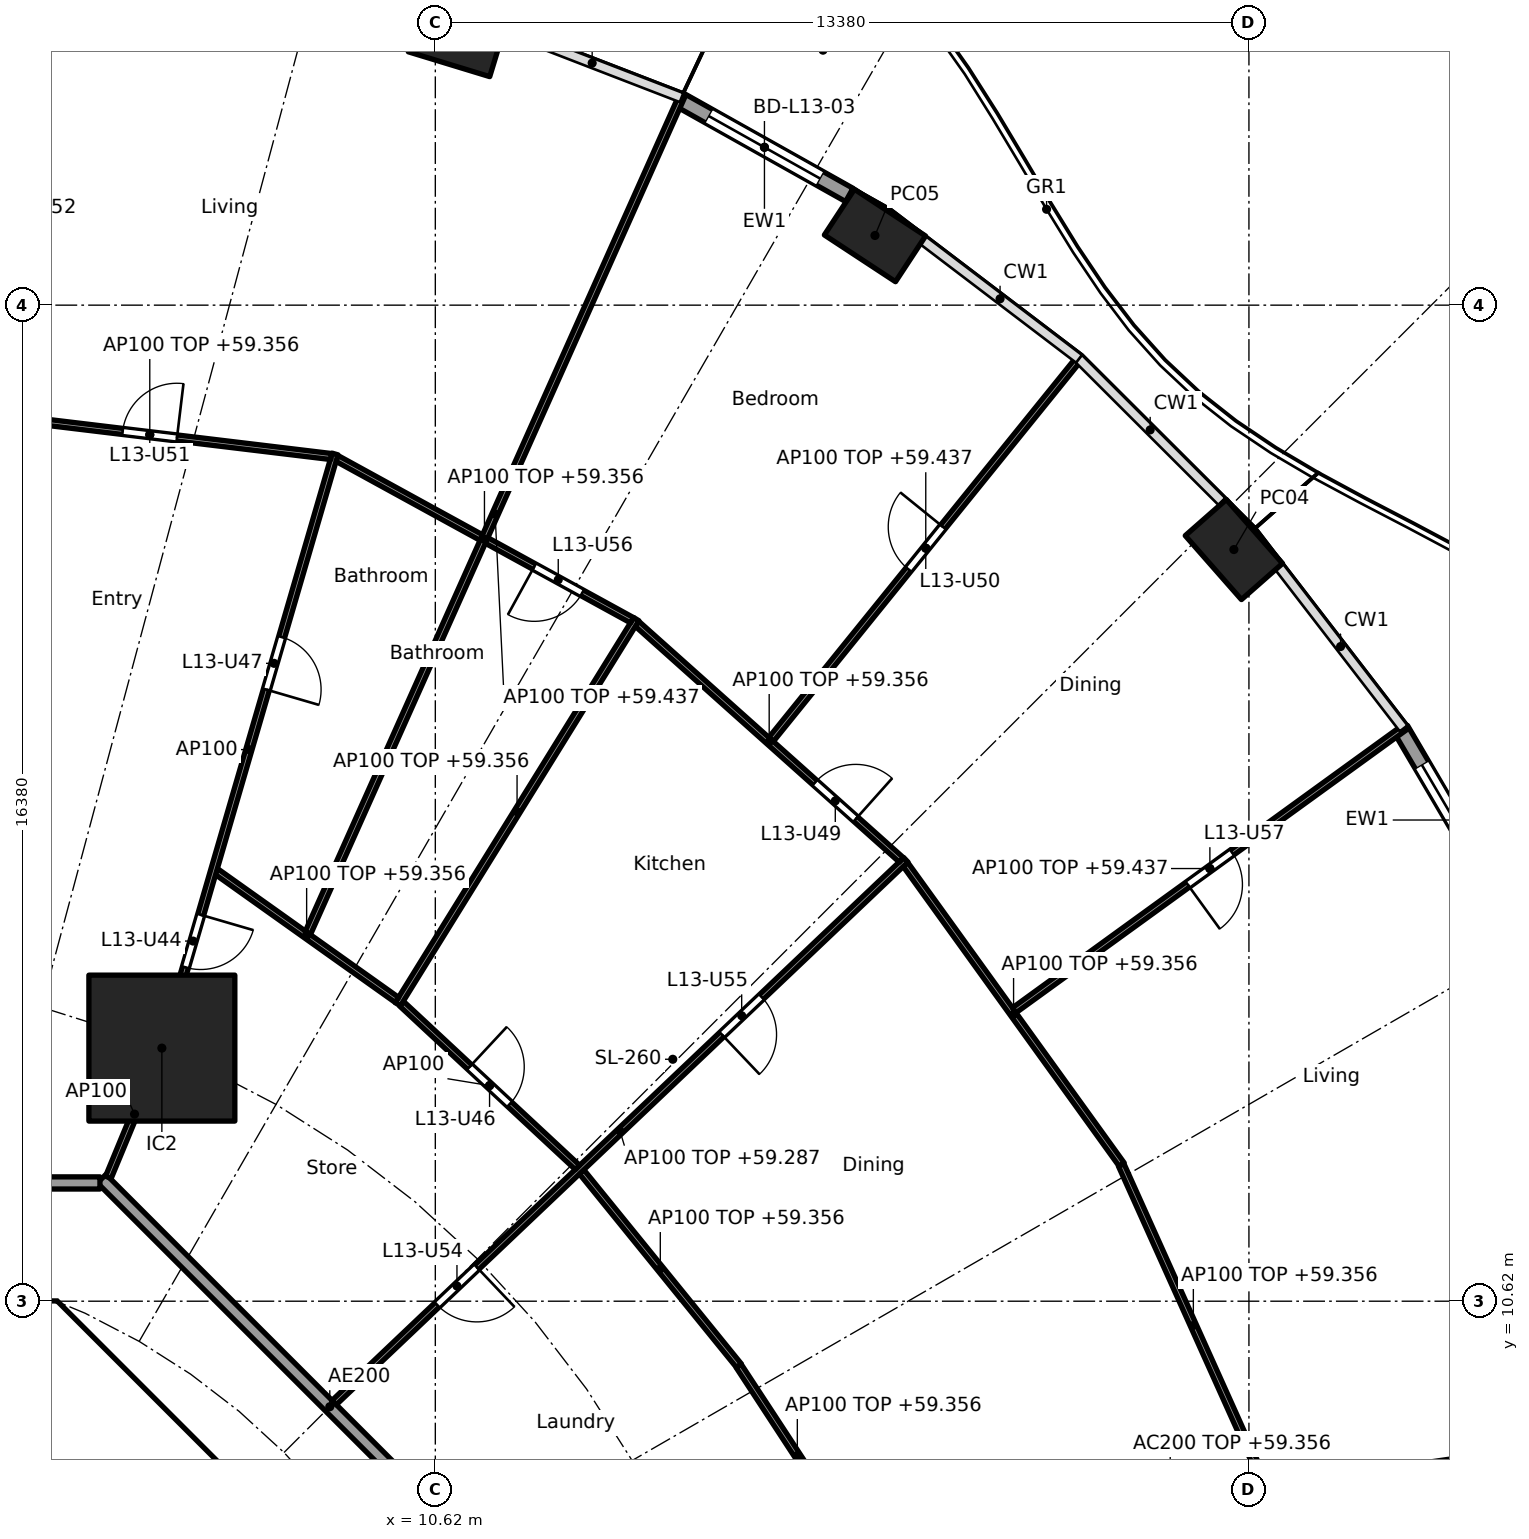
"""IFC4 building model, lengths in metres.
Left out: names, types, materials, properties, quantities, classifications, styles, units other than length and angle.
Written with IfcOpenShell. Run it as: python <this file> out.ifc"""

import sys

from ifc_helpers import new_model, si_unit, direction, frame, frame_2d, origin, origin_2d, place, context, subcontext, project, spatial, polyline, rectangle, hollow_rectangle, outline, extrude, element, fill, save


model = new_model("IFC4")
c1 = context("Model", 3, precision=1e-05, world=origin(), true_north=direction((0.0, 1.0)))
c2 = subcontext(c1, "Body", "Model", "MODEL_VIEW")
j1 = project(units=[si_unit("LENGTHUNIT", "METRE"), si_unit("PLANEANGLEUNIT", "RADIAN")], contexts=[c1])
p1 = place(None, origin())
s1 = spatial("IfcSite", under=j1, at=p1, CompositionType="ELEMENT")
p2 = place(p1, origin())
s2 = spatial("IfcBuilding", under=s1, at=p2, CompositionType="ELEMENT")
p3 = place(p2, frame((0.0, 0.0, 56.6)))
s3 = spatial("IfcBuildingStorey", under=s2, at=p3, CompositionType="ELEMENT", Elevation=56.6)
for number, where, z_axis, x_axis in (
    (1, (23.752, 22.981, 0.0), (0.0, 0.0, 1.0), (-0.66, 0.751, 0.0)),
    (2, (17.85, 28.146, 0.0), (0.0, 0.0, 1.0), (-0.836, 0.549, 0.0)),
    (3, (10.976, 31.393, 0.0), (0.0, 0.0, 1.0), (-0.957, 0.292, 0.0)),
):
    element("IfcColumn", number, at=place(p3, frame(where, z_axis=z_axis, x_axis=x_axis)), inside=s3, PredefinedType="COLUMN", context=c2, shape_type="SweptSolid", body=[
        extrude(hollow_rectangle(XDim=1.4, YDim=0.9, WallThickness=0.05, at=origin_2d()), origin(), (0.0, 0.0, 1.0), 3.7),
    ])
p4 = place(p3, frame((6.123, 14.782, 0.0), z_axis=(0.0, 0.0, 1.0), x_axis=(1.0, 0.0, 0.0)))
e4 = element("IfcColumn", 4, at=p4, inside=s3, PredefinedType="COLUMN", context=c2, shape_type="SweptSolid", body=[
    extrude(rectangle(XDim=2.4, YDim=2.4, at=origin_2d()), origin(), (0.0, 0.0, 1.0), 3.7),
])
p5 = place(p3, frame((26.5, 20.026, 0.0), z_axis=(0.0, 0.0, 1.0), x_axis=(0.506311160839, -0.862350861546, 0.0)))
e5 = element("IfcWall", 5, at=p5, inside=s3, PredefinedType="SOLIDWALL", context=c2, shape_type="SweptSolid", body=[
    extrude(rectangle(XDim=3.462, YDim=0.25, at=frame_2d((1.731, 0.0))), origin(), (0.0, 0.0, 1.0), 3.44),
])
p6 = place(p5, frame((0.681, 0.0, 0.0)))
e6 = element("IfcOpeningElement", 6, at=p6, cuts=e5, PredefinedType="OPENING", context=c2, shape_type="SweptSolid", body=[
    extrude(rectangle(XDim=2.1, YDim=2.4, at=frame_2d((1.05, 1.2))), frame((0.0, 0.135, 0.0), z_axis=(0.0, -1.0, 0.0), x_axis=(1.0, 0.0, 0.0)), (0.0, 0.0, 1.0), 0.27),
])
p7 = place(p3, frame((14.637, 30.379, 0.0), z_axis=(0.0, 0.0, 1.0), x_axis=(0.872102558443, -0.489323132048, 0.0)))
e7 = element("IfcWall", 7, at=p7, inside=s3, PredefinedType="SOLIDWALL", context=c2, shape_type="SweptSolid", body=[
    extrude(rectangle(XDim=3.201, YDim=0.25, at=frame_2d((1.601, 0.0))), origin(), (0.0, 0.0, 1.0), 3.44),
])
p8 = place(p7, frame((0.551, 0.0, 0.0)))
e8 = element("IfcOpeningElement", 8, at=p8, cuts=e7, PredefinedType="OPENING", context=c2, shape_type="SweptSolid", body=[
    extrude(rectangle(XDim=2.1, YDim=2.4, at=frame_2d((1.05, 1.2))), frame((0.0, 0.135, 0.0), z_axis=(0.0, -1.0, 0.0), x_axis=(1.0, 0.0, 0.0)), (0.0, 0.0, 1.0), 0.27),
])
p9 = place(p3, frame((9.988, 4.613, 0.0), z_axis=(0.0, 0.0, 1.0), x_axis=(-0.707106781187, 0.707106781187, 0.0)))
e9 = element("IfcWall", 9, at=p9, inside=s3, PredefinedType="SHEAR", context=c2, shape_type="SweptSolid", body=[
    extrude(rectangle(XDim=7.602, YDim=0.6, at=frame_2d((3.801, 0.0))), origin(), (0.0, 0.0, 1.0), 3.44),
])
p10 = place(p9, frame((3.201, 0.0, 0.0)))
e10 = element("IfcOpeningElement", 10, at=p10, cuts=e9, PredefinedType="OPENING", context=c2, shape_type="SweptSolid", body=[
    extrude(rectangle(XDim=1.2, YDim=2.1, at=frame_2d((0.6, 1.05))), frame((0.0, 0.31, 0.0), z_axis=(0.0, -1.0, 0.0), x_axis=(1.0, 0.0, 0.0)), (0.0, 0.0, 1.0), 0.62),
])
p11 = place(p3, origin())
e11 = element("IfcWall", 11, at=p11, inside=s3, PredefinedType="SHEAR", context=c2, shape_type="SweptSolid", body=[
    extrude(outline(polyline([(-4.152, 10.025), (-4.401, 9.776), (-4.825, 10.2), (-4.401, 10.625), (4.401, 10.625), (4.825, 10.2), (4.401, 9.776), (4.152, 10.025), (-4.152, 10.025)])), origin(), (0.0, 0.0, 1.0), 3.44),
])
p12 = place(p3, frame((14.832, 6.13, 0.0), z_axis=(0.0, 0.0, 1.0), x_axis=(0.989836541293, 0.142209779978, 0.0)))
e12 = element("IfcWall", 12, at=p12, inside=s3, PredefinedType="PARTITIONING", context=c2, shape_type="SweptSolid", body=[
    extrude(rectangle(XDim=15.909, YDim=0.2, at=frame_2d((7.955, 0.0))), origin(), (0.0, 0.0, 1.0), 2.756),
])
p13 = place(p3, frame((12.635, 5.134, 0.0), z_axis=(0.0, 0.0, 1.0), x_axis=(-0.707106781187, 0.707106781187, 0.0)))
e13 = element("IfcWall", 13, at=p13, inside=s3, PredefinedType="PARTITIONING", context=c2, shape_type="SweptSolid", body=[
    extrude(rectangle(XDim=10.609, YDim=0.2, at=frame_2d((5.305, 0.0))), origin(), (0.0, 0.0, 1.0), 3.44),
])
p14 = place(p3, frame((5.104, 12.565, 0.0), z_axis=(0.0, 0.0, 1.0), x_axis=(-1.0, 0.0, 0.0)))
e14 = element("IfcWall", 14, at=p14, inside=s3, PredefinedType="PARTITIONING", context=c2, shape_type="SweptSolid", body=[
    extrude(rectangle(XDim=10.409, YDim=0.2, at=frame_2d((5.205, 0.0))), origin(), (0.0, 0.0, 1.0), 3.44),
])
p15 = place(p14, frame((1.185, 0.0, 0.0)))
e15 = element("IfcOpeningElement", 15, at=p15, cuts=e14, PredefinedType="OPENING", context=c2, shape_type="SweptSolid", body=[
    extrude(rectangle(XDim=1.0, YDim=2.1, at=frame_2d((0.5, 1.05))), frame((0.0, 0.11, 0.0), z_axis=(0.0, -1.0, 0.0), x_axis=(1.0, 0.0, 0.0)), (0.0, 0.0, 1.0), 0.22),
])
p16 = place(p3, frame((17.537, 6.61, 0.0), z_axis=(0.0, 0.0, 1.0), x_axis=(-0.547637987196, 0.836715384692, 0.0)))
e16 = element("IfcWall", 16, at=p16, inside=s3, PredefinedType="PARTITIONING", context=c2, shape_type="SweptSolid", body=[
    extrude(rectangle(XDim=3.52, YDim=0.1, at=frame_2d((1.76, 0.0))), origin(), (0.0, 0.0, 1.0), 2.756),
])
p17 = place(p3, frame((24.273, 7.584, 0.0), z_axis=(0.0, 0.0, 1.0), x_axis=(-0.410201529109, 0.911994904326, 0.0)))
e17 = element("IfcWall", 17, at=p17, inside=s3, PredefinedType="PARTITIONING", context=c2, shape_type="SweptSolid", body=[
    extrude(rectangle(XDim=5.787, YDim=0.1, at=frame_2d((2.894, 0.0))), origin(), (0.0, 0.0, 1.0), 2.756),
])
p18 = place(p3, frame((15.614, 9.559, 0.0), z_axis=(0.0, 0.0, 1.0), x_axis=(-0.63012473344, 0.776493928056, 0.0)))
e18 = element("IfcWall", 18, at=p18, inside=s3, PredefinedType="PARTITIONING", context=c2, shape_type="SweptSolid", body=[
    extrude(rectangle(XDim=4.106, YDim=0.1, at=frame_2d((2.053, 0.0))), origin(), (0.0, 0.0, 1.0), 2.756),
])
p19 = place(p3, frame((21.908, 12.866, 0.0), z_axis=(0.0, 0.0, 1.0), x_axis=(-0.584558392935, 0.811351640936, 0.0)))
e19 = element("IfcWall", 19, at=p19, inside=s3, PredefinedType="PARTITIONING", context=c2, shape_type="SweptSolid", body=[
    extrude(rectangle(XDim=6.084, YDim=0.1, at=frame_2d((3.042, 0.0))), origin(), (0.0, 0.0, 1.0), 2.756),
])
p20 = place(p3, frame((20.141, 15.405, 0.0), z_axis=(0.0, 0.0, 1.0), x_axis=(0.809834895779, 0.58665785734, 0.0)))
e20 = element("IfcWall", 20, at=p20, inside=s3, PredefinedType="PARTITIONING", context=c2, shape_type="SweptSolid", body=[
    extrude(rectangle(XDim=7.945, YDim=0.1, at=frame_2d((3.973, 0.0))), origin(), (0.0, 0.0, 1.0), 2.837),
])
p21 = place(p20, frame((3.522, 0.0, 0.0)))
e21 = element("IfcOpeningElement", 21, at=p21, cuts=e20, PredefinedType="OPENING", context=c2, shape_type="SweptSolid", body=[
    extrude(rectangle(XDim=0.9, YDim=2.1, at=frame_2d((0.45, 1.05))), frame((0.0, 0.06, 0.0), z_axis=(0.0, -1.0, 0.0), x_axis=(1.0, 0.0, 0.0)), (0.0, 0.0, 1.0), 0.12),
])
p22 = place(p3, frame((8.957, 8.953, 0.0), z_axis=(0.0, 0.0, 1.0), x_axis=(0.725250022034, 0.688485588476, 0.0)))
e22 = element("IfcWall", 22, at=p22, inside=s3, PredefinedType="PARTITIONING", context=c2, shape_type="SweptSolid", body=[
    extrude(rectangle(XDim=12.963, YDim=0.1, at=frame_2d((6.481, 0.0))), origin(), (0.0, 0.0, 1.0), 2.687),
])
p23 = place(p22, frame((2.333, 0.0, 0.0)))
e23 = element("IfcOpeningElement", 23, at=p23, cuts=e22, PredefinedType="OPENING", context=c2, shape_type="SweptSolid", body=[
    extrude(rectangle(XDim=0.9, YDim=2.1, at=frame_2d((0.45, 1.05))), frame((0.0, 0.06, 0.0), z_axis=(0.0, -1.0, 0.0), x_axis=(1.0, 0.0, 0.0)), (0.0, 0.0, 1.0), 0.12),
])
p24 = place(p22, frame((8.79, 0.0, 0.0)))
e24 = element("IfcOpeningElement", 24, at=p24, cuts=e22, PredefinedType="OPENING", context=c2, shape_type="SweptSolid", body=[
    extrude(rectangle(XDim=0.9, YDim=2.1, at=frame_2d((0.45, 1.05))), frame((0.0, 0.06, 0.0), z_axis=(0.0, -1.0, 0.0), x_axis=(1.0, 0.0, 0.0)), (0.0, 0.0, 1.0), 0.12),
])
p25 = place(p3, frame((12.958, 12.82, 0.0), z_axis=(0.0, 0.0, 1.0), x_axis=(-0.732022571638, 0.681280378855, 0.0)))
e25 = element("IfcWall", 25, at=p25, inside=s3, PredefinedType="PARTITIONING", context=c2, shape_type="SweptSolid", body=[
    extrude(rectangle(XDim=3.95, YDim=0.1, at=frame_2d((1.975, 0.0))), origin(), (0.0, 0.0, 1.0), 3.44),
])
p26 = place(p25, frame((1.525, 0.0, 0.0)))
e26 = element("IfcOpeningElement", 26, at=p26, cuts=e25, PredefinedType="OPENING", context=c2, shape_type="SweptSolid", body=[
    extrude(rectangle(XDim=0.9, YDim=2.1, at=frame_2d((0.45, 1.05))), frame((0.0, 0.06, 0.0), z_axis=(0.0, -1.0, 0.0), x_axis=(1.0, 0.0, 0.0)), (0.0, 0.0, 1.0), 0.12),
])
p27 = place(p3, frame((18.285, 17.877, 0.0), z_axis=(0.0, 0.0, 1.0), x_axis=(-0.745806142791, 0.666163041136, 0.0)))
e27 = element("IfcWall", 27, at=p27, inside=s3, PredefinedType="PARTITIONING", context=c2, shape_type="SweptSolid", body=[
    extrude(rectangle(XDim=5.831, YDim=0.1, at=frame_2d((2.915, 0.0))), origin(), (0.0, 0.0, 1.0), 2.756),
])
p28 = place(p27, frame((1.008, 0.0, 0.0)))
e28 = element("IfcOpeningElement", 28, at=p28, cuts=e27, PredefinedType="OPENING", context=c2, shape_type="SweptSolid", body=[
    extrude(rectangle(XDim=0.9, YDim=2.1, at=frame_2d((0.45, 1.05))), frame((0.0, 0.06, 0.0), z_axis=(0.0, -1.0, 0.0), x_axis=(1.0, 0.0, 0.0)), (0.0, 0.0, 1.0), 0.12),
])
p29 = place(p3, frame((16.142, 19.858, 0.0), z_axis=(0.0, 0.0, 1.0), x_axis=(0.628738066508, 0.777617157555, 0.0)))
e29 = element("IfcWall", 29, at=p29, inside=s3, PredefinedType="PARTITIONING", context=c2, shape_type="SweptSolid", body=[
    extrude(rectangle(XDim=8.091, YDim=0.1, at=frame_2d((4.045, 0.0))), origin(), (0.0, 0.0, 1.0), 2.837),
])
p30 = place(p29, frame((3.595, 0.0, 0.0)))
e30 = element("IfcOpeningElement", 30, at=p30, cuts=e29, PredefinedType="OPENING", context=c2, shape_type="SweptSolid", body=[
    extrude(rectangle(XDim=0.9, YDim=2.1, at=frame_2d((0.45, 1.05))), frame((0.0, 0.06, 0.0), z_axis=(0.0, -1.0, 0.0), x_axis=(1.0, 0.0, 0.0)), (0.0, 0.0, 1.0), 0.12),
])
p31 = place(p3, frame((10.003, 15.503, 0.0), z_axis=(0.0, 0.0, 1.0), x_axis=(0.52645953022, 0.850200189979, 0.0)))
e31 = element("IfcWall", 31, at=p31, inside=s3, PredefinedType="PARTITIONING", context=c2, shape_type="SweptSolid", body=[
    extrude(rectangle(XDim=7.45, YDim=0.1, at=frame_2d((3.725, 0.0))), origin(), (0.0, 0.0, 1.0), 2.756),
])
p32 = place(p3, frame((9.989, 15.574, 0.0), z_axis=(0.0, 0.0, 1.0), x_axis=(-0.81494477814, 0.57953861699, 0.0)))
e32 = element("IfcWall", 32, at=p32, inside=s3, PredefinedType="PARTITIONING", context=c2, shape_type="SweptSolid", body=[
    extrude(rectangle(XDim=3.644, YDim=0.1, at=frame_2d((1.822, 0.0))), origin(), (0.0, 0.0, 1.0), 2.756),
])
p33 = place(p3, frame((13.855, 21.818, 0.0), z_axis=(0.0, 0.0, 1.0), x_axis=(-0.876794415294, 0.480865421203, 0.0)))
e33 = element("IfcWall", 33, at=p33, inside=s3, PredefinedType="PARTITIONING", context=c2, shape_type="SweptSolid", body=[
    extrude(rectangle(XDim=5.536, YDim=0.1, at=frame_2d((2.768, 0.0))), origin(), (0.0, 0.0, 1.0), 2.756),
])
p34 = place(p33, frame((0.934, 0.0, 0.0)))
e34 = element("IfcOpeningElement", 34, at=p34, cuts=e33, PredefinedType="OPENING", context=c2, shape_type="SweptSolid", body=[
    extrude(rectangle(XDim=0.9, YDim=2.1, at=frame_2d((0.45, 1.05))), frame((0.0, 0.06, 0.0), z_axis=(0.0, -1.0, 0.0), x_axis=(1.0, 0.0, 0.0)), (0.0, 0.0, 1.0), 0.12),
])
p35 = place(p3, frame((8.524, 16.676, 0.0), z_axis=(0.0, 0.0, 1.0), x_axis=(0.408065177262, 0.912952797852, 0.0)))
e35 = element("IfcWall", 35, at=p35, inside=s3, PredefinedType="PARTITIONING", context=c2, shape_type="SweptSolid", body=[
    extrude(rectangle(XDim=15.089, YDim=0.1, at=frame_2d((7.544, 0.0))), origin(), (0.0, 0.0, 1.0), 2.837),
])
p36 = place(p3, frame((5.243, 12.657, 0.0), z_axis=(0.0, 0.0, 1.0), x_axis=(0.382719158442, 0.923864733477, 0.0)))
e36 = element("IfcWall", 36, at=p36, inside=s3, PredefinedType="PARTITIONING", context=c2, shape_type="SweptSolid", body=[
    extrude(rectangle(XDim=2.25, YDim=0.1, at=frame_2d((1.125, 0.0))), origin(), (0.0, 0.0, 1.0), 3.44),
])
p37 = place(p3, frame((6.137, 14.83, 0.0), z_axis=(0.0, 0.0, 1.0), x_axis=(0.279843546189, 0.960045618529, 0.0)))
e37 = element("IfcWall", 37, at=p37, inside=s3, PredefinedType="PARTITIONING", context=c2, shape_type="SweptSolid", body=[
    extrude(rectangle(XDim=10.127, YDim=0.1, at=frame_2d((5.063, 0.0))), origin(), (0.0, 0.0, 1.0), 3.44),
])
p38 = place(p37, frame((1.334, 0.0, 0.0)))
e38 = element("IfcOpeningElement", 38, at=p38, cuts=e37, PredefinedType="OPENING", context=c2, shape_type="SweptSolid", body=[
    extrude(rectangle(XDim=0.9, YDim=2.1, at=frame_2d((0.45, 1.05))), frame((0.0, 0.06, 0.0), z_axis=(0.0, -1.0, 0.0), x_axis=(1.0, 0.0, 0.0)), (0.0, 0.0, 1.0), 0.12),
])
p39 = place(p37, frame((6.091, 0.0, 0.0)))
e39 = element("IfcOpeningElement", 39, at=p39, cuts=e37, PredefinedType="OPENING", context=c2, shape_type="SweptSolid", body=[
    extrude(rectangle(XDim=0.9, YDim=2.1, at=frame_2d((0.45, 1.05))), frame((0.0, 0.06, 0.0), z_axis=(0.0, -1.0, 0.0), x_axis=(1.0, 0.0, 0.0)), (0.0, 0.0, 1.0), 0.12),
])
p40 = place(p3, frame((8.907, 24.51, 0.0), z_axis=(0.0, 0.0, 1.0), x_axis=(-0.992836798252, 0.119478416615, 0.0)))
e40 = element("IfcWall", 40, at=p40, inside=s3, PredefinedType="PARTITIONING", context=c2, shape_type="SweptSolid", body=[
    extrude(rectangle(XDim=6.01, YDim=0.1, at=frame_2d((3.005, 0.0))), origin(), (0.0, 0.0, 1.0), 2.756),
])
p41 = place(p40, frame((2.555, 0.0, 0.0)))
e41 = element("IfcOpeningElement", 41, at=p41, cuts=e40, PredefinedType="OPENING", context=c2, shape_type="SweptSolid", body=[
    extrude(rectangle(XDim=0.9, YDim=2.1, at=frame_2d((0.45, 1.05))), frame((0.0, 0.06, 0.0), z_axis=(0.0, -1.0, 0.0), x_axis=(1.0, 0.0, 0.0)), (0.0, 0.0, 1.0), 0.12),
])
p42 = place(p6, origin())
e42 = element("IfcDoor", 42, at=p42, inside=s3, OperationType="SLIDING_TO_LEFT", PredefinedType="DOOR", context=c2, shape_type="SweptSolid", body=[
    extrude(rectangle(XDim=2.1, YDim=2.4, at=frame_2d((1.05, 1.2))), frame((0.0, 0.025, 0.0), z_axis=(0.0, -1.0, 0.0), x_axis=(1.0, 0.0, 0.0)), (0.0, 0.0, 1.0), 0.05),
])
fill(e6, e42)
p43 = place(p8, origin())
e43 = element("IfcDoor", 43, at=p43, inside=s3, OperationType="SLIDING_TO_LEFT", PredefinedType="DOOR", context=c2, shape_type="SweptSolid", body=[
    extrude(rectangle(XDim=2.1, YDim=2.4, at=frame_2d((1.05, 1.2))), frame((0.0, 0.025, 0.0), z_axis=(0.0, -1.0, 0.0), x_axis=(1.0, 0.0, 0.0)), (0.0, 0.0, 1.0), 0.05),
])
fill(e8, e43)
p44 = place(p38, frame((0.9, 0.0, 0.0), x_axis=(-1.0, 0.0, 0.0)))
e44 = element("IfcDoor", 44, at=p44, inside=s3, OperationType="SINGLE_SWING_LEFT", PredefinedType="DOOR", context=c2, shape_type="SweptSolid", body=[
    extrude(rectangle(XDim=0.9, YDim=2.1, at=frame_2d((0.45, 1.05))), frame((0.0, 0.025, 0.0), z_axis=(0.0, -1.0, 0.0), x_axis=(1.0, 0.0, 0.0)), (0.0, 0.0, 1.0), 0.05),
])
fill(e38, e44)
p45 = place(p26, frame((0.9, 0.0, 0.0), x_axis=(-1.0, 0.0, 0.0)))
e45 = element("IfcDoor", 45, at=p45, inside=s3, OperationType="SINGLE_SWING_LEFT", PredefinedType="DOOR", context=c2, shape_type="SweptSolid", body=[
    extrude(rectangle(XDim=0.9, YDim=2.1, at=frame_2d((0.45, 1.05))), frame((0.0, 0.025, 0.0), z_axis=(0.0, -1.0, 0.0), x_axis=(1.0, 0.0, 0.0)), (0.0, 0.0, 1.0), 0.05),
])
fill(e26, e45)
p46 = place(p39, frame((0.9, 0.0, 0.0), x_axis=(-1.0, 0.0, 0.0)))
e46 = element("IfcDoor", 46, at=p46, inside=s3, OperationType="SINGLE_SWING_RIGHT", PredefinedType="DOOR", context=c2, shape_type="SweptSolid", body=[
    extrude(rectangle(XDim=0.9, YDim=2.1, at=frame_2d((0.45, 1.05))), frame((0.0, 0.025, 0.0), z_axis=(0.0, -1.0, 0.0), x_axis=(1.0, 0.0, 0.0)), (0.0, 0.0, 1.0), 0.05),
])
fill(e39, e46)
p47 = place(p28, frame((0.9, 0.0, 0.0), x_axis=(-1.0, 0.0, 0.0)))
e47 = element("IfcDoor", 47, at=p47, inside=s3, OperationType="SINGLE_SWING_RIGHT", PredefinedType="DOOR", context=c2, shape_type="SweptSolid", body=[
    extrude(rectangle(XDim=0.9, YDim=2.1, at=frame_2d((0.45, 1.05))), frame((0.0, 0.025, 0.0), z_axis=(0.0, -1.0, 0.0), x_axis=(1.0, 0.0, 0.0)), (0.0, 0.0, 1.0), 0.05),
])
fill(e28, e47)
p48 = place(p30, origin())
e48 = element("IfcDoor", 48, at=p48, inside=s3, OperationType="SINGLE_SWING_RIGHT", PredefinedType="DOOR", context=c2, shape_type="SweptSolid", body=[
    extrude(rectangle(XDim=0.9, YDim=2.1, at=frame_2d((0.45, 1.05))), frame((0.0, 0.025, 0.0), z_axis=(0.0, -1.0, 0.0), x_axis=(1.0, 0.0, 0.0)), (0.0, 0.0, 1.0), 0.05),
])
fill(e30, e48)
p49 = place(p41, frame((0.9, 0.0, 0.0), x_axis=(-1.0, 0.0, 0.0)))
e49 = element("IfcDoor", 49, at=p49, inside=s3, OperationType="SINGLE_SWING_RIGHT", PredefinedType="DOOR", context=c2, shape_type="SweptSolid", body=[
    extrude(rectangle(XDim=0.9, YDim=2.1, at=frame_2d((0.45, 1.05))), frame((0.0, 0.025, 0.0), z_axis=(0.0, -1.0, 0.0), x_axis=(1.0, 0.0, 0.0)), (0.0, 0.0, 1.0), 0.05),
])
fill(e41, e49)
p50 = place(p23, frame((0.9, 0.0, 0.0), x_axis=(-1.0, 0.0, 0.0)))
e50 = element("IfcDoor", 50, at=p50, inside=s3, OperationType="SINGLE_SWING_LEFT", PredefinedType="DOOR", context=c2, shape_type="SweptSolid", body=[
    extrude(rectangle(XDim=0.9, YDim=2.1, at=frame_2d((0.45, 1.05))), frame((0.0, 0.025, 0.0), z_axis=(0.0, -1.0, 0.0), x_axis=(1.0, 0.0, 0.0)), (0.0, 0.0, 1.0), 0.05),
])
fill(e23, e50)
p51 = place(p24, frame((0.9, 0.0, 0.0), x_axis=(-1.0, 0.0, 0.0)))
e51 = element("IfcDoor", 51, at=p51, inside=s3, OperationType="SINGLE_SWING_RIGHT", PredefinedType="DOOR", context=c2, shape_type="SweptSolid", body=[
    extrude(rectangle(XDim=0.9, YDim=2.1, at=frame_2d((0.45, 1.05))), frame((0.0, 0.025, 0.0), z_axis=(0.0, -1.0, 0.0), x_axis=(1.0, 0.0, 0.0)), (0.0, 0.0, 1.0), 0.05),
])
fill(e24, e51)
p52 = place(p34, origin())
e52 = element("IfcDoor", 52, at=p52, inside=s3, OperationType="SINGLE_SWING_RIGHT", PredefinedType="DOOR", context=c2, shape_type="SweptSolid", body=[
    extrude(rectangle(XDim=0.9, YDim=2.1, at=frame_2d((0.45, 1.05))), frame((0.0, 0.025, 0.0), z_axis=(0.0, -1.0, 0.0), x_axis=(1.0, 0.0, 0.0)), (0.0, 0.0, 1.0), 0.05),
])
fill(e34, e52)
p53 = place(p21, frame((0.9, 0.0, 0.0), x_axis=(-1.0, 0.0, 0.0)))
e53 = element("IfcDoor", 53, at=p53, inside=s3, OperationType="SINGLE_SWING_RIGHT", PredefinedType="DOOR", context=c2, shape_type="SweptSolid", body=[
    extrude(rectangle(XDim=0.9, YDim=2.1, at=frame_2d((0.45, 1.05))), frame((0.0, 0.025, 0.0), z_axis=(0.0, -1.0, 0.0), x_axis=(1.0, 0.0, 0.0)), (0.0, 0.0, 1.0), 0.05),
])
fill(e21, e53)
save(model, sys.argv[1])
